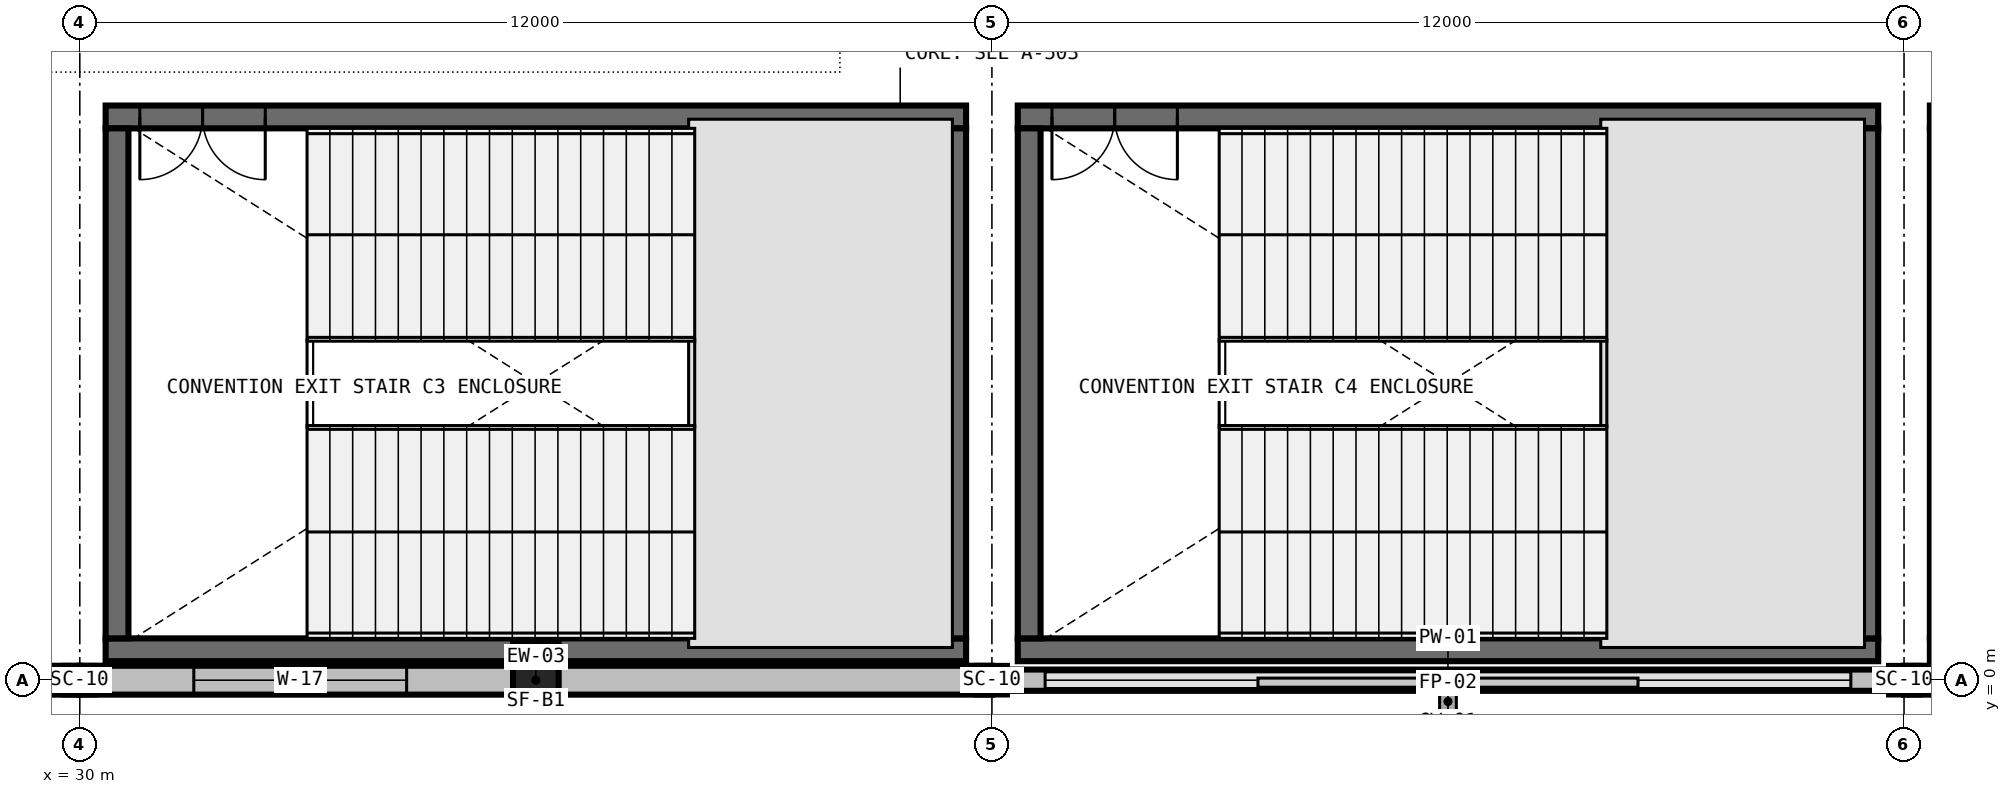
"""IFC4 building model, lengths in metres.
Left out: names, types, materials, properties, quantities, classifications, styles, units other than length and angle.
Written with IfcOpenShell. Run it as: python <this file> out.ifc"""

import sys

from ifc_helpers import new_model, si_unit, direction, frame, frame_2d, origin, origin_2d, place, context, subcontext, project, spatial, rectangle, i_section, extrude, element, fill, save


model = new_model("IFC4")
c1 = context("Model", 3, precision=1e-05, world=origin(), true_north=direction((0.0, 1.0)))
c2 = subcontext(c1, "Body", "Model", "MODEL_VIEW")
j1 = project(units=[si_unit("LENGTHUNIT", "METRE"), si_unit("PLANEANGLEUNIT", "RADIAN")], contexts=[c1])
p1 = place(None, origin())
s1 = spatial("IfcSite", under=j1, at=p1, CompositionType="ELEMENT")
p2 = place(p1, origin())
s2 = spatial("IfcBuilding", under=s1, at=p2, CompositionType="ELEMENT")
p3 = place(p2, frame((0.0, 0.0, 12.0)))
s3 = spatial("IfcBuildingStorey", under=s2, at=p3, CompositionType="ELEMENT", Elevation=12.0)
for number, where, z_axis, x_axis in (
    (1, (30.0, 0.0, 0.0), (0.0, 0.0, 1.0), (1.0, 0.0, 0.0)),
    (2, (42.0, 0.0, 0.0), (0.0, 0.0, 1.0), (1.0, 0.0, 0.0)),
    (3, (54.0, 0.0, 0.0), (0.0, 0.0, 1.0), (1.0, 0.0, 0.0)),
):
    element("IfcColumn", number, at=place(p3, frame(where, z_axis=z_axis, x_axis=x_axis)), inside=s3, PredefinedType="COLUMN", context=c2, shape_type="SweptSolid", body=[
        extrude(i_section(OverallWidth=0.394, OverallDepth=0.375, WebThickness=0.017, FlangeThickness=0.028, FilletRadius=0.031, at=origin_2d()), origin(), (0.0, 0.0, 1.0), 6.0),
    ])
p4 = place(p3, frame((36.0, 0.0, 0.0), z_axis=(0.0, 0.0, 1.0), x_axis=(1.0, 0.0, 0.0)))
e4 = element("IfcColumn", 4, at=p4, inside=s3, PredefinedType="PILASTER", context=c2, shape_type="SweptSolid", body=[
    extrude(rectangle(XDim=0.6, YDim=1.0, at=origin_2d()), origin(), (0.0, 0.0, 1.0), 6.0),
])
p5 = place(p3, frame((41.66, 0.4, 0.0), z_axis=(0.0, 0.0, 1.0), x_axis=(-1.0, 0.0, 0.0)))
e5 = element("IfcWall", 5, at=p5, inside=s3, PredefinedType="SHEAR", context=c2, shape_type="SweptSolid", body=[
    extrude(rectangle(XDim=11.32, YDim=0.3, at=frame_2d((5.66, 0.0))), origin(), (0.0, 0.0, 1.0), 6.0),
])
p6 = place(p3, frame((41.66, 7.41, 0.0), z_axis=(0.0, 0.0, 1.0), x_axis=(-1.0, 0.0, 0.0)))
e6 = element("IfcWall", 6, at=p6, inside=s3, PredefinedType="SHEAR", context=c2, shape_type="SweptSolid", body=[
    extrude(rectangle(XDim=11.32, YDim=0.3, at=frame_2d((5.66, 0.0))), origin(), (0.0, 0.0, 1.0), 6.0),
])
p7 = place(p6, frame((9.22, 0.0, 0.0)))
e7 = element("IfcOpeningElement", 7, at=p7, cuts=e6, PredefinedType="OPENING", context=c2, shape_type="SweptSolid", body=[
    extrude(rectangle(XDim=1.65, YDim=2.25, at=frame_2d((0.825, 1.125))), frame((0.0, 0.165, 0.0), z_axis=(0.0, -1.0, 0.0), x_axis=(1.0, 0.0, 0.0)), (0.0, 0.0, 1.0), 0.33),
])
for number, where, z_axis, x_axis in (
    (8, (30.49, 7.26, 0.0), (0.0, 0.0, 1.0), (0.0, -1.0, 0.0)),
    (9, (41.51, 0.55, 0.0), (0.0, 0.0, 1.0), (0.0, 1.0, 0.0)),
):
    element("IfcWall", number, at=place(p3, frame(where, z_axis=z_axis, x_axis=x_axis)), inside=s3, PredefinedType="SHEAR", context=c2, shape_type="SweptSolid", body=[
        extrude(rectangle(XDim=6.71, YDim=0.3, at=frame_2d((3.355, 0.0))), origin(), (0.0, 0.0, 1.0), 6.0),
    ])
p8 = place(p3, frame((53.66, 0.4, 0.0), z_axis=(0.0, 0.0, 1.0), x_axis=(-1.0, 0.0, 0.0)))
e10 = element("IfcWall", 10, at=p8, inside=s3, PredefinedType="SHEAR", context=c2, shape_type="SweptSolid", body=[
    extrude(rectangle(XDim=11.32, YDim=0.3, at=frame_2d((5.66, 0.0))), origin(), (0.0, 0.0, 1.0), 6.0),
])
p9 = place(p3, frame((53.66, 7.41, 0.0), z_axis=(0.0, 0.0, 1.0), x_axis=(-1.0, 0.0, 0.0)))
e11 = element("IfcWall", 11, at=p9, inside=s3, PredefinedType="SHEAR", context=c2, shape_type="SweptSolid", body=[
    extrude(rectangle(XDim=11.32, YDim=0.3, at=frame_2d((5.66, 0.0))), origin(), (0.0, 0.0, 1.0), 6.0),
])
p10 = place(p9, frame((9.22, 0.0, 0.0)))
e12 = element("IfcOpeningElement", 12, at=p10, cuts=e11, PredefinedType="OPENING", context=c2, shape_type="SweptSolid", body=[
    extrude(rectangle(XDim=1.65, YDim=2.25, at=frame_2d((0.825, 1.125))), frame((0.0, 0.165, 0.0), z_axis=(0.0, -1.0, 0.0), x_axis=(1.0, 0.0, 0.0)), (0.0, 0.0, 1.0), 0.33),
])
for number, where, z_axis, x_axis in (
    (13, (42.49, 7.26, 0.0), (0.0, 0.0, 1.0), (0.0, -1.0, 0.0)),
    (14, (53.51, 0.55, 0.0), (0.0, 0.0, 1.0), (0.0, 1.0, 0.0)),
):
    element("IfcWall", number, at=place(p3, frame(where, z_axis=z_axis, x_axis=x_axis)), inside=s3, PredefinedType="SHEAR", context=c2, shape_type="SweptSolid", body=[
        extrude(rectangle(XDim=6.71, YDim=0.3, at=frame_2d((3.355, 0.0))), origin(), (0.0, 0.0, 1.0), 6.0),
    ])
p11 = place(p3, frame((65.66, 0.4, 0.0), z_axis=(0.0, 0.0, 1.0), x_axis=(-1.0, 0.0, 0.0)))
e15 = element("IfcWall", 15, at=p11, inside=s3, PredefinedType="SHEAR", context=c2, shape_type="SweptSolid", body=[
    extrude(rectangle(XDim=11.32, YDim=0.3, at=frame_2d((5.66, 0.0))), origin(), (0.0, 0.0, 1.0), 6.0),
])
p12 = place(p3, frame((65.66, 7.41, 0.0), z_axis=(0.0, 0.0, 1.0), x_axis=(-1.0, 0.0, 0.0)))
e16 = element("IfcWall", 16, at=p12, inside=s3, PredefinedType="SHEAR", context=c2, shape_type="SweptSolid", body=[
    extrude(rectangle(XDim=11.32, YDim=0.3, at=frame_2d((5.66, 0.0))), origin(), (0.0, 0.0, 1.0), 6.0),
])
p13 = place(p12, frame((9.22, 0.0, 0.0)))
e17 = element("IfcOpeningElement", 17, at=p13, cuts=e16, PredefinedType="OPENING", context=c2, shape_type="SweptSolid", body=[
    extrude(rectangle(XDim=1.65, YDim=2.25, at=frame_2d((0.825, 1.125))), frame((0.0, 0.165, 0.0), z_axis=(0.0, -1.0, 0.0), x_axis=(1.0, 0.0, 0.0)), (0.0, 0.0, 1.0), 0.33),
])
p14 = place(p3, frame((54.49, 7.26, 0.0), z_axis=(0.0, 0.0, 1.0), x_axis=(0.0, -1.0, 0.0)))
e18 = element("IfcWall", 18, at=p14, inside=s3, PredefinedType="SHEAR", context=c2, shape_type="SweptSolid", body=[
    extrude(rectangle(XDim=6.71, YDim=0.3, at=frame_2d((3.355, 0.0))), origin(), (0.0, 0.0, 1.0), 6.0),
])
p15 = place(p3, frame((24.0, 0.0, 0.0), z_axis=(0.0, 0.0, 1.0), x_axis=(1.0, 0.0, 0.0)))
e19 = element("IfcWall", 19, at=p15, inside=s3, PredefinedType="STANDARD", context=c2, shape_type="SweptSolid", body=[
    extrude(rectangle(XDim=6.0, YDim=0.38, at=frame_2d((3.0, 0.0))), origin(), (0.0, 0.0, 1.0), 4.746),
])
p16 = place(p3, frame((30.0, 0.0, 0.0), z_axis=(0.0, 0.0, 1.0), x_axis=(1.0, 0.0, 0.0)))
e20 = element("IfcWall", 20, at=p16, inside=s3, PredefinedType="STANDARD", context=c2, shape_type="SweptSolid", body=[
    extrude(rectangle(XDim=12.0, YDim=0.38, at=frame_2d((6.0, 0.0))), origin(), (0.0, 0.0, 1.0), 4.746),
])
p17 = place(p16, frame((1.5, 0.0, 0.85)))
e21 = element("IfcOpeningElement", 21, at=p17, cuts=e20, PredefinedType="OPENING", context=c2, shape_type="SweptSolid", body=[
    extrude(rectangle(XDim=2.8, YDim=2.4, at=frame_2d((1.4, 1.2))), frame((0.0, 0.205, 0.0), z_axis=(0.0, -1.0, 0.0), x_axis=(1.0, 0.0, 0.0)), (0.0, 0.0, 1.0), 0.41),
])
p18 = place(p3, frame((42.0, 0.0, 0.0), z_axis=(0.0, 0.0, 1.0), x_axis=(1.0, 0.0, 0.0)))
e22 = element("IfcWall", 22, at=p18, inside=s3, PredefinedType="PARAPET", context=c2, shape_type="SweptSolid", body=[
    extrude(rectangle(XDim=12.0, YDim=0.28, at=frame_2d((6.0, 0.0))), origin(), (0.0, 0.0, 1.0), 0.2),
])
p19 = place(p3, frame((54.0, 0.0, 0.0), z_axis=(0.0, 0.0, 1.0), x_axis=(1.0, 0.0, 0.0)))
e23 = element("IfcWall", 23, at=p19, inside=s3, PredefinedType="STANDARD", context=c2, shape_type="SweptSolid", body=[
    extrude(rectangle(XDim=12.0, YDim=0.38, at=frame_2d((6.0, 0.0))), origin(), (0.0, 0.0, 1.0), 4.746),
])
p20 = place(p19, frame((1.5, 0.0, 0.85)))
e24 = element("IfcOpeningElement", 24, at=p20, cuts=e23, PredefinedType="OPENING", context=c2, shape_type="SweptSolid", body=[
    extrude(rectangle(XDim=2.2, YDim=1.95, at=frame_2d((1.1, 0.975))), frame((0.0, 0.205, 0.0), z_axis=(0.0, -1.0, 0.0), x_axis=(1.0, 0.0, 0.0)), (0.0, 0.0, 1.0), 0.41),
])
p21 = place(p7, origin())
e25 = element("IfcDoor", 25, at=p21, inside=s3, OperationType="DOUBLE_DOOR_SINGLE_SWING", PredefinedType="DOOR", context=c2, shape_type="SweptSolid", body=[
    extrude(rectangle(XDim=1.65, YDim=2.25, at=frame_2d((0.825, 1.125))), frame((0.0, 0.025, 0.0), z_axis=(0.0, -1.0, 0.0), x_axis=(1.0, 0.0, 0.0)), (0.0, 0.0, 1.0), 0.05),
])
fill(e7, e25)
p22 = place(p10, origin())
e26 = element("IfcDoor", 26, at=p22, inside=s3, OperationType="DOUBLE_DOOR_SINGLE_SWING", PredefinedType="DOOR", context=c2, shape_type="SweptSolid", body=[
    extrude(rectangle(XDim=1.65, YDim=2.25, at=frame_2d((0.825, 1.125))), frame((0.0, 0.025, 0.0), z_axis=(0.0, -1.0, 0.0), x_axis=(1.0, 0.0, 0.0)), (0.0, 0.0, 1.0), 0.05),
])
fill(e12, e26)
p23 = place(p17, origin())
e27 = element("IfcWindow", 27, at=p23, inside=s3, PartitioningType="DOUBLE_PANEL_VERTICAL", PredefinedType="WINDOW", context=c2, shape_type="SweptSolid", body=[
    extrude(rectangle(XDim=2.8, YDim=2.4, at=frame_2d((1.4, 1.2))), frame((0.0, 0.03, 0.0), z_axis=(0.0, -1.0, 0.0), x_axis=(1.0, 0.0, 0.0)), (0.0, 0.0, 1.0), 0.06),
])
fill(e21, e27)
save(model, sys.argv[1])
